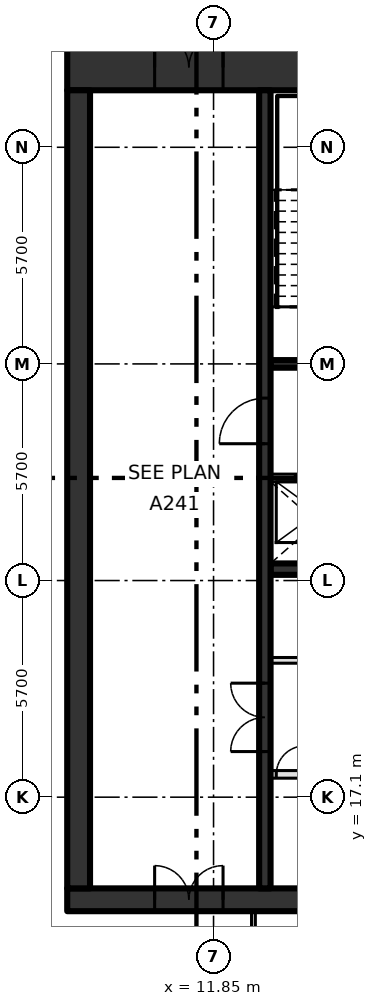
"""IFC4 building model, lengths in metres.
Left out: names, types, materials, properties, quantities, classifications, styles, units other than length and angle.
Written with IfcOpenShell. Run it as: python <this file> out.ifc"""

import sys

from ifc_helpers import new_model, si_unit, direction, frame, frame_2d, origin, place, context, subcontext, project, spatial, rectangle, extrude, element, fill, save


model = new_model("IFC4")
c1 = context("Model", 3, precision=1e-05, world=origin(), true_north=direction((0.0, 1.0)))
c2 = subcontext(c1, "Body", "Model", "MODEL_VIEW")
j1 = project(units=[si_unit("LENGTHUNIT", "METRE"), si_unit("PLANEANGLEUNIT", "RADIAN")], contexts=[c1])
p1 = place(None, origin())
s1 = spatial("IfcSite", under=j1, at=p1, CompositionType="ELEMENT")
p2 = place(p1, origin())
s2 = spatial("IfcBuilding", under=s1, at=p2, CompositionType="ELEMENT")
p3 = place(p2, frame((0.0, 0.0, 306.6)))
s3 = spatial("IfcBuildingStorey", under=s2, at=p3, CompositionType="ELEMENT", Elevation=306.6)
p4 = place(p3, frame((8.0, 14.4, -0.3), z_axis=(0.0, 0.0, 1.0), x_axis=(1.0, 0.0, 0.0)))
e1 = element("IfcWall", 1, at=p4, inside=s3, PredefinedType="SHEAR", context=c2, shape_type="SweptSolid", body=[
    extrude(rectangle(XDim=22.8, YDim=0.6, at=frame_2d((11.4, 0.0))), origin(), (0.0, 0.0, 1.0), 4.2),
])
p5 = place(p4, frame((2.3, 0.0, 0.3)))
e2 = element("IfcOpeningElement", 2, at=p5, cuts=e1, PredefinedType="OPENING", context=c2, shape_type="SweptSolid", body=[
    extrude(rectangle(XDim=1.8, YDim=2.1, at=frame_2d((0.9, 1.05))), frame((0.0, 0.31, 0.0), z_axis=(0.0, -1.0, 0.0), x_axis=(1.0, 0.0, 0.0)), (0.0, 0.0, 1.0), 0.62),
])
p6 = place(p3, frame((8.0, 36.3, -0.3), z_axis=(0.0, 0.0, 1.0), x_axis=(1.0, 0.0, 0.0)))
e3 = element("IfcWall", 3, at=p6, inside=s3, PredefinedType="SHEAR", context=c2, shape_type="SweptSolid", body=[
    extrude(rectangle(XDim=22.8, YDim=1.2, at=frame_2d((11.4, 0.0))), origin(), (0.0, 0.0, 1.0), 4.2),
])
p7 = place(p6, frame((2.3, 0.0, 0.3)))
e4 = element("IfcOpeningElement", 4, at=p7, cuts=e3, PredefinedType="OPENING", context=c2, shape_type="SweptSolid", body=[
    extrude(rectangle(XDim=1.8, YDim=2.1, at=frame_2d((0.9, 1.05))), frame((0.0, 0.61, 0.0), z_axis=(0.0, -1.0, 0.0), x_axis=(1.0, 0.0, 0.0)), (0.0, 0.0, 1.0), 1.22),
])
p8 = place(p3, frame((8.3, 14.7, -0.3), z_axis=(0.0, 0.0, 1.0), x_axis=(0.0, 1.0, 0.0)))
e5 = element("IfcWall", 5, at=p8, inside=s3, PredefinedType="SHEAR", context=c2, shape_type="SweptSolid", body=[
    extrude(rectangle(XDim=21.0, YDim=0.6, at=frame_2d((10.5, 0.0))), origin(), (0.0, 0.0, 1.0), 4.2),
])
p9 = place(p3, frame((13.35, 17.7, 0.0), z_axis=(0.0, 0.0, 1.0), x_axis=(1.0, 0.0, 0.0)))
e6 = element("IfcWall", 6, at=p9, inside=s3, PredefinedType="SOLIDWALL", context=c2, shape_type="SweptSolid", body=[
    extrude(rectangle(XDim=13.425, YDim=0.2, at=frame_2d((6.712, 0.0))), origin(), (0.0, 0.0, 1.0), 3.9),
])
p10 = place(p9, frame((2.0, 0.0, 0.0)))
e7 = element("IfcOpeningElement", 7, at=p10, cuts=e6, PredefinedType="OPENING", context=c2, shape_type="SweptSolid", body=[
    extrude(rectangle(XDim=1.1, YDim=2.1, at=frame_2d((0.55, 1.05))), frame((0.0, 0.11, 0.0), z_axis=(0.0, -1.0, 0.0), x_axis=(1.0, 0.0, 0.0)), (0.0, 0.0, 1.0), 0.22),
])
p11 = place(p9, frame((4.7, 0.0, 0.0)))
e8 = element("IfcOpeningElement", 8, at=p11, cuts=e6, PredefinedType="OPENING", context=c2, shape_type="SweptSolid", body=[
    extrude(rectangle(XDim=1.1, YDim=2.1, at=frame_2d((0.55, 1.05))), frame((0.0, 0.11, 0.0), z_axis=(0.0, -1.0, 0.0), x_axis=(1.0, 0.0, 0.0)), (0.0, 0.0, 1.0), 0.22),
])
p12 = place(p9, frame((7.4, 0.0, 0.0)))
e9 = element("IfcOpeningElement", 9, at=p12, cuts=e6, PredefinedType="OPENING", context=c2, shape_type="SweptSolid", body=[
    extrude(rectangle(XDim=1.1, YDim=2.1, at=frame_2d((0.55, 1.05))), frame((0.0, 0.11, 0.0), z_axis=(0.0, -1.0, 0.0), x_axis=(1.0, 0.0, 0.0)), (0.0, 0.0, 1.0), 0.22),
])
p13 = place(p9, frame((10.1, 0.0, 0.0)))
e10 = element("IfcOpeningElement", 10, at=p13, cuts=e6, PredefinedType="OPENING", context=c2, shape_type="SweptSolid", body=[
    extrude(rectangle(XDim=1.1, YDim=2.1, at=frame_2d((0.55, 1.05))), frame((0.0, 0.11, 0.0), z_axis=(0.0, -1.0, 0.0), x_axis=(1.0, 0.0, 0.0)), (0.0, 0.0, 1.0), 0.22),
])
p14 = place(p9, frame((0.15, 0.0, 0.0)))
e11 = element("IfcOpeningElement", 11, at=p14, cuts=e6, PredefinedType="OPENING", context=c2, shape_type="SweptSolid", body=[
    extrude(rectangle(XDim=0.75, YDim=2.1, at=frame_2d((0.375, 1.05))), frame((0.0, 0.11, 0.0), z_axis=(0.0, -1.0, 0.0), x_axis=(1.0, 0.0, 0.0)), (0.0, 0.0, 1.0), 0.22),
])
p15 = place(p9, frame((12.3, 0.0, 0.0)))
e12 = element("IfcOpeningElement", 12, at=p15, cuts=e6, PredefinedType="OPENING", context=c2, shape_type="SweptSolid", body=[
    extrude(rectangle(XDim=0.75, YDim=2.1, at=frame_2d((0.375, 1.05))), frame((0.0, 0.11, 0.0), z_axis=(0.0, -1.0, 0.0), x_axis=(1.0, 0.0, 0.0)), (0.0, 0.0, 1.0), 0.22),
])
p16 = place(p3, frame((13.35, 20.7, 0.0), z_axis=(0.0, 0.0, 1.0), x_axis=(1.0, 0.0, 0.0)))
e13 = element("IfcWall", 13, at=p16, inside=s3, PredefinedType="PARTITIONING", context=c2, shape_type="SweptSolid", body=[
    extrude(rectangle(XDim=13.425, YDim=0.15, at=frame_2d((6.712, 0.0))), origin(), (0.0, 0.0, 1.0), 3.9),
])
p17 = place(p16, frame((0.75, 0.0, 0.0)))
e14 = element("IfcOpeningElement", 14, at=p17, cuts=e13, PredefinedType="OPENING", context=c2, shape_type="SweptSolid", body=[
    extrude(rectangle(XDim=0.9, YDim=2.1, at=frame_2d((0.45, 1.05))), frame((0.0, 0.085, 0.0), z_axis=(0.0, -1.0, 0.0), x_axis=(1.0, 0.0, 0.0)), (0.0, 0.0, 1.0), 0.17),
])
p18 = place(p16, frame((7.5, 0.0, 0.0)))
e15 = element("IfcOpeningElement", 15, at=p18, cuts=e13, PredefinedType="OPENING", context=c2, shape_type="SweptSolid", body=[
    extrude(rectangle(XDim=0.9, YDim=2.1, at=frame_2d((0.45, 1.05))), frame((0.0, 0.085, 0.0), z_axis=(0.0, -1.0, 0.0), x_axis=(1.0, 0.0, 0.0)), (0.0, 0.0, 1.0), 0.17),
])
p19 = place(p3, frame((13.35, 23.1, 0.0), z_axis=(0.0, 0.0, 1.0), x_axis=(1.0, 0.0, 0.0)))
e16 = element("IfcWall", 16, at=p19, inside=s3, PredefinedType="SHEAR", context=c2, shape_type="SweptSolid", body=[
    extrude(rectangle(XDim=16.85, YDim=0.3, at=frame_2d((8.425, 0.0))), origin(), (0.0, 0.0, 1.0), 3.9),
])
p20 = place(p3, frame((13.35, 25.5, 0.0), z_axis=(0.0, 0.0, 1.0), x_axis=(1.0, 0.0, 0.0)))
e17 = element("IfcWall", 17, at=p20, inside=s3, PredefinedType="SOLIDWALL", context=c2, shape_type="SweptSolid", body=[
    extrude(rectangle(XDim=16.85, YDim=0.2, at=frame_2d((8.425, 0.0))), origin(), (0.0, 0.0, 1.0), 3.9),
])
p21 = place(p20, frame((0.65, 0.0, 0.0)))
e18 = element("IfcOpeningElement", 18, at=p21, cuts=e17, PredefinedType="OPENING", context=c2, shape_type="SweptSolid", body=[
    extrude(rectangle(XDim=1.1, YDim=2.1, at=frame_2d((0.55, 1.05))), frame((0.0, 0.11, 0.0), z_axis=(0.0, -1.0, 0.0), x_axis=(1.0, 0.0, 0.0)), (0.0, 0.0, 1.0), 0.22),
])
p22 = place(p20, frame((3.35, 0.0, 0.0)))
e19 = element("IfcOpeningElement", 19, at=p22, cuts=e17, PredefinedType="OPENING", context=c2, shape_type="SweptSolid", body=[
    extrude(rectangle(XDim=1.1, YDim=2.1, at=frame_2d((0.55, 1.05))), frame((0.0, 0.11, 0.0), z_axis=(0.0, -1.0, 0.0), x_axis=(1.0, 0.0, 0.0)), (0.0, 0.0, 1.0), 0.22),
])
p23 = place(p20, frame((6.05, 0.0, 0.0)))
e20 = element("IfcOpeningElement", 20, at=p23, cuts=e17, PredefinedType="OPENING", context=c2, shape_type="SweptSolid", body=[
    extrude(rectangle(XDim=1.1, YDim=2.1, at=frame_2d((0.55, 1.05))), frame((0.0, 0.11, 0.0), z_axis=(0.0, -1.0, 0.0), x_axis=(1.0, 0.0, 0.0)), (0.0, 0.0, 1.0), 0.22),
])
p24 = place(p20, frame((8.75, 0.0, 0.0)))
e21 = element("IfcOpeningElement", 21, at=p24, cuts=e17, PredefinedType="OPENING", context=c2, shape_type="SweptSolid", body=[
    extrude(rectangle(XDim=1.1, YDim=2.1, at=frame_2d((0.55, 1.05))), frame((0.0, 0.11, 0.0), z_axis=(0.0, -1.0, 0.0), x_axis=(1.0, 0.0, 0.0)), (0.0, 0.0, 1.0), 0.22),
])
p25 = place(p20, frame((13.0, 0.0, 0.0)))
e22 = element("IfcOpeningElement", 22, at=p25, cuts=e17, PredefinedType="OPENING", context=c2, shape_type="SweptSolid", body=[
    extrude(rectangle(XDim=0.9, YDim=2.1, at=frame_2d((0.45, 1.05))), frame((0.0, 0.11, 0.0), z_axis=(0.0, -1.0, 0.0), x_axis=(1.0, 0.0, 0.0)), (0.0, 0.0, 1.0), 0.22),
])
p26 = place(p3, frame((13.35, 28.5, 0.0), z_axis=(0.0, 0.0, 1.0), x_axis=(1.0, 0.0, 0.0)))
e23 = element("IfcWall", 23, at=p26, inside=s3, PredefinedType="SOLIDWALL", context=c2, shape_type="SweptSolid", body=[
    extrude(rectangle(XDim=6.75, YDim=0.2, at=frame_2d((3.375, 0.0))), origin(), (0.0, 0.0, 1.0), 3.9),
])
p27 = place(p26, frame((0.95, 0.0, 0.0)))
e24 = element("IfcOpeningElement", 24, at=p27, cuts=e23, PredefinedType="OPENING", context=c2, shape_type="SweptSolid", body=[
    extrude(rectangle(XDim=1.2, YDim=2.1, at=frame_2d((0.6, 1.05))), frame((0.0, 0.11, 0.0), z_axis=(0.0, -1.0, 0.0), x_axis=(1.0, 0.0, 0.0)), (0.0, 0.0, 1.0), 0.22),
])
p28 = place(p26, frame((3.75, 0.0, 0.0)))
e25 = element("IfcOpeningElement", 25, at=p28, cuts=e23, PredefinedType="OPENING", context=c2, shape_type="SweptSolid", body=[
    extrude(rectangle(XDim=1.1, YDim=2.1, at=frame_2d((0.55, 1.05))), frame((0.0, 0.11, 0.0), z_axis=(0.0, -1.0, 0.0), x_axis=(1.0, 0.0, 0.0)), (0.0, 0.0, 1.0), 0.22),
])
p29 = place(p3, frame((13.2, 14.7, 0.0), z_axis=(0.0, 0.0, 1.0), x_axis=(0.0, 1.0, 0.0)))
e26 = element("IfcWall", 26, at=p29, inside=s3, PredefinedType="SHEAR", context=c2, shape_type="SweptSolid", body=[
    extrude(rectangle(XDim=21.0, YDim=0.3, at=frame_2d((10.5, 0.0))), origin(), (0.0, 0.0, 1.0), 3.9),
])
p30 = place(p29, frame((3.6, 0.0, 0.0)))
e27 = element("IfcOpeningElement", 27, at=p30, cuts=e26, PredefinedType="OPENING", context=c2, shape_type="SweptSolid", body=[
    extrude(rectangle(XDim=1.8, YDim=2.1, at=frame_2d((0.9, 1.05))), frame((0.0, 0.16, 0.0), z_axis=(0.0, -1.0, 0.0), x_axis=(1.0, 0.0, 0.0)), (0.0, 0.0, 1.0), 0.32),
])
p31 = place(p29, frame((11.7, 0.0, 0.0)))
e28 = element("IfcOpeningElement", 28, at=p31, cuts=e26, PredefinedType="OPENING", context=c2, shape_type="SweptSolid", body=[
    extrude(rectangle(XDim=1.2, YDim=2.1, at=frame_2d((0.6, 1.05))), frame((0.0, 0.16, 0.0), z_axis=(0.0, -1.0, 0.0), x_axis=(1.0, 0.0, 0.0)), (0.0, 0.0, 1.0), 0.32),
])
p32 = place(p3, frame((12.9, 10.078, 0.0), z_axis=(0.0, 0.0, 1.0), x_axis=(0.0, 1.0, 0.0)))
e29 = element("IfcWall", 29, at=p32, inside=s3, PredefinedType="PARTITIONING", context=c2, shape_type="SweptSolid", body=[
    extrude(rectangle(XDim=4.022, YDim=0.1, at=frame_2d((2.011, 0.0))), origin(), (0.0, 0.0, 1.0), 3.9),
])
p33 = place(p21, origin())
e30 = element("IfcDoor", 30, at=p33, inside=s3, OperationType="SLIDING_TO_LEFT", PredefinedType="DOOR", context=c2, shape_type="SweptSolid", body=[
    extrude(rectangle(XDim=1.1, YDim=2.1, at=frame_2d((0.55, 1.05))), frame((0.0, 0.025, 0.0), z_axis=(0.0, -1.0, 0.0), x_axis=(1.0, 0.0, 0.0)), (0.0, 0.0, 1.0), 0.05),
])
fill(e18, e30)
p34 = place(p14, origin())
e31 = element("IfcDoor", 31, at=p34, inside=s3, OperationType="SINGLE_SWING_RIGHT", PredefinedType="DOOR", context=c2, shape_type="SweptSolid", body=[
    extrude(rectangle(XDim=0.75, YDim=2.1, at=frame_2d((0.375, 1.05))), frame((0.0, 0.025, 0.0), z_axis=(0.0, -1.0, 0.0), x_axis=(1.0, 0.0, 0.0)), (0.0, 0.0, 1.0), 0.05),
])
fill(e11, e31)
p35 = place(p30, origin())
e32 = element("IfcDoor", 32, at=p35, inside=s3, OperationType="DOUBLE_DOOR_SINGLE_SWING", PredefinedType="DOOR", context=c2, shape_type="SweptSolid", body=[
    extrude(rectangle(XDim=1.8, YDim=2.1, at=frame_2d((0.9, 1.05))), frame((0.0, 0.025, 0.0), z_axis=(0.0, -1.0, 0.0), x_axis=(1.0, 0.0, 0.0)), (0.0, 0.0, 1.0), 0.05),
])
fill(e27, e32)
p36 = place(p31, origin())
e33 = element("IfcDoor", 33, at=p36, inside=s3, OperationType="SINGLE_SWING_LEFT", PredefinedType="DOOR", context=c2, shape_type="SweptSolid", body=[
    extrude(rectangle(XDim=1.2, YDim=2.1, at=frame_2d((0.6, 1.05))), frame((0.0, 0.025, 0.0), z_axis=(0.0, -1.0, 0.0), x_axis=(1.0, 0.0, 0.0)), (0.0, 0.0, 1.0), 0.05),
])
fill(e28, e33)
p37 = place(p7, origin())
e34 = element("IfcDoor", 34, at=p37, inside=s3, OperationType="DOUBLE_DOOR_SINGLE_SWING", PredefinedType="DOOR", context=c2, shape_type="SweptSolid", body=[
    extrude(rectangle(XDim=1.8, YDim=2.1, at=frame_2d((0.9, 1.05))), frame((0.0, 0.025, 0.0), z_axis=(0.0, -1.0, 0.0), x_axis=(1.0, 0.0, 0.0)), (0.0, 0.0, 1.0), 0.05),
])
fill(e4, e34)
p38 = place(p5, origin())
e35 = element("IfcDoor", 35, at=p38, inside=s3, OperationType="DOUBLE_DOOR_SINGLE_SWING", PredefinedType="DOOR", context=c2, shape_type="SweptSolid", body=[
    extrude(rectangle(XDim=1.8, YDim=2.1, at=frame_2d((0.9, 1.05))), frame((0.0, 0.025, 0.0), z_axis=(0.0, -1.0, 0.0), x_axis=(1.0, 0.0, 0.0)), (0.0, 0.0, 1.0), 0.05),
])
fill(e2, e35)
save(model, sys.argv[1])
